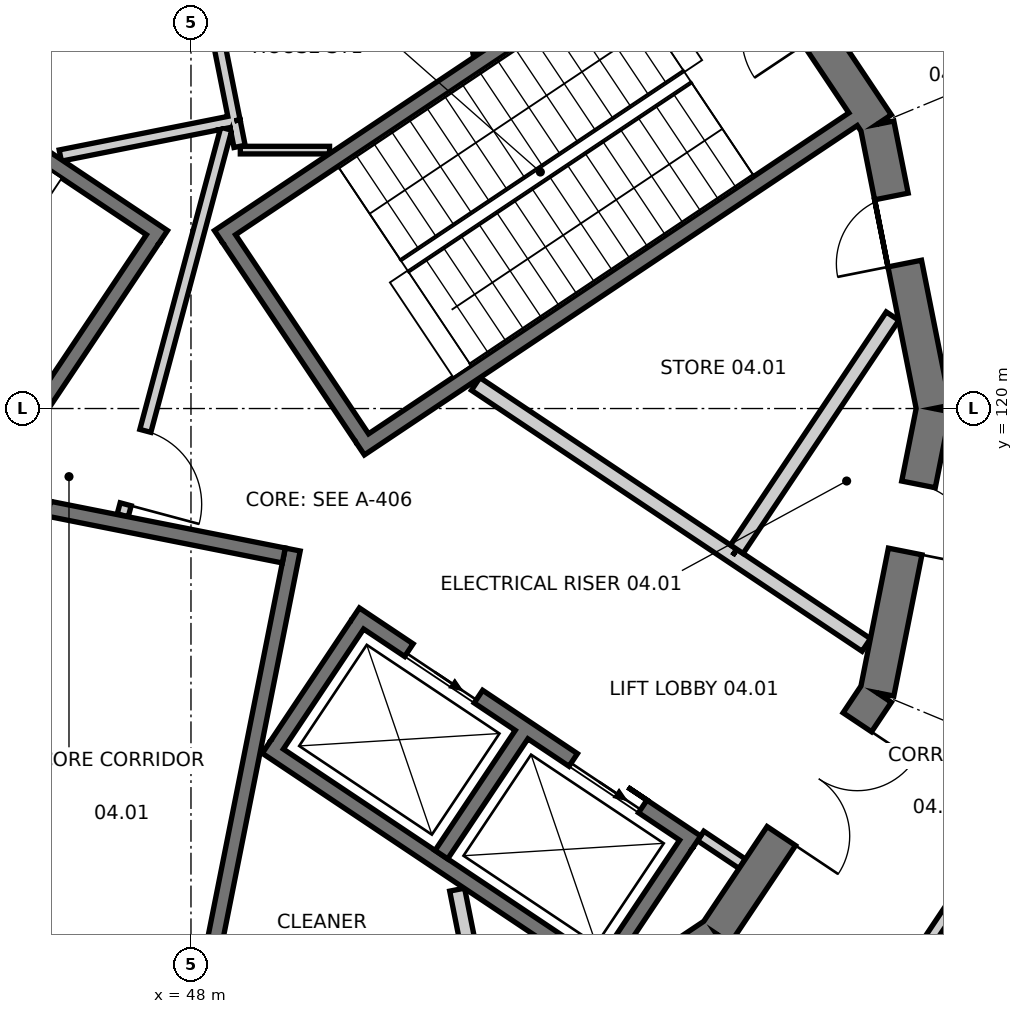
"""IFC4 building model, lengths in metres.
Left out: names, types, materials, properties, quantities, classifications, styles, units other than length and angle.
Written with IfcOpenShell. Run it as: python <this file> out.ifc"""

import sys

from ifc_helpers import new_model, si_unit, direction, frame, frame_2d, origin, place, context, subcontext, project, spatial, polyline, rectangle, outline, extrude, element, fill, save


model = new_model("IFC4")
c1 = context("Model", 3, precision=1e-05, world=origin(), true_north=direction((0.0, 1.0)))
c2 = subcontext(c1, "Body", "Model", "MODEL_VIEW")
j1 = project(units=[si_unit("LENGTHUNIT", "METRE"), si_unit("PLANEANGLEUNIT", "RADIAN")], contexts=[c1])
p1 = place(None, origin())
s1 = spatial("IfcSite", under=j1, at=p1, CompositionType="ELEMENT")
p2 = place(p1, origin())
s2 = spatial("IfcBuilding", under=s1, at=p2, CompositionType="ELEMENT")
p3 = place(p2, frame((0.0, 0.0, 20.4)))
s3 = spatial("IfcBuildingStorey", under=s2, at=p3, CompositionType="ELEMENT", Elevation=20.4)
p4 = place(p3, frame((57.771, 120.0, 0.0), z_axis=(0.0, 0.0, 1.0), x_axis=(-0.195069197673, 0.98078948206, 0.0)))
e1 = element("IfcWall", 1, at=p4, inside=s3, PredefinedType="SHEAR", context=c2, shape_type="SweptSolid", body=[
    extrude(outline(polyline([(-0.045, -0.225), (3.857, -0.225), (3.768, 0.225), (0.045, 0.225), (-0.045, -0.225)])), origin(), (0.0, 0.0, 1.0), 4.52),
])
p5 = place(p4, frame((1.945, 0.0, 0.0)))
e2 = element("IfcOpeningElement", 2, at=p5, cuts=e1, PredefinedType="OPENING", context=c2, shape_type="SweptSolid", body=[
    extrude(rectangle(XDim=0.9, YDim=2.1, at=frame_2d((0.45, 1.05))), frame((0.0, 0.235, 0.0), z_axis=(0.0, -1.0, 0.0), x_axis=(1.0, 0.0, 0.0)), (0.0, 0.0, 1.0), 0.47),
])
p6 = place(p3, frame((57.027, 123.739, 0.0), z_axis=(0.0, 0.0, 1.0), x_axis=(-0.555542277102, 0.83148829117, 0.0)))
e3 = element("IfcWall", 3, at=p6, inside=s3, PredefinedType="SHEAR", context=c2, shape_type="SweptSolid", body=[
    extrude(outline(polyline([(-0.045, -0.225), (3.857, -0.225), (3.768, 0.225), (0.045, 0.225), (-0.045, -0.225)])), origin(), (0.0, 0.0, 1.0), 4.52),
])
p7 = place(p6, frame((1.406, 0.0, 0.0)))
e4 = element("IfcOpeningElement", 4, at=p7, cuts=e3, PredefinedType="OPENING", context=c2, shape_type="SweptSolid", body=[
    extrude(rectangle(XDim=1.0, YDim=2.1, at=frame_2d((0.5, 1.05))), frame((0.0, 0.235, 0.0), z_axis=(0.0, -1.0, 0.0), x_axis=(1.0, 0.0, 0.0)), (0.0, 0.0, 1.0), 0.47),
])
p8 = place(p3, frame((51.739, 110.973, 0.0), z_axis=(0.0, 0.0, 1.0), x_axis=(0.83148829117, 0.555542277102, 0.0)))
e5 = element("IfcWall", 5, at=p8, inside=s3, PredefinedType="SHEAR", context=c2, shape_type="SweptSolid", body=[
    extrude(outline(polyline([(-0.045, -0.225), (3.857, -0.225), (3.768, 0.225), (0.045, 0.225), (-0.045, -0.225)])), origin(), (0.0, 0.0, 1.0), 4.52),
])
p9 = place(p3, frame((54.909, 113.091, 0.0), z_axis=(0.0, 0.0, 1.0), x_axis=(0.555542277102, 0.83148829117, 0.0)))
e6 = element("IfcWall", 6, at=p9, inside=s3, PredefinedType="SHEAR", context=c2, shape_type="SweptSolid", body=[
    extrude(outline(polyline([(-0.045, -0.225), (3.857, -0.225), (3.768, 0.225), (0.045, 0.225), (-0.045, -0.225)])), origin(), (0.0, 0.0, 1.0), 4.52),
])
p10 = place(p9, frame((1.545, 0.0, 0.0)))
e7 = element("IfcOpeningElement", 7, at=p10, cuts=e6, PredefinedType="OPENING", context=c2, shape_type="SweptSolid", body=[
    extrude(rectangle(XDim=1.8, YDim=2.1, at=frame_2d((0.9, 1.05))), frame((0.0, 0.235, 0.0), z_axis=(0.0, -1.0, 0.0), x_axis=(1.0, 0.0, 0.0)), (0.0, 0.0, 1.0), 0.47),
])
p11 = place(p3, frame((57.027, 116.261, 0.0), z_axis=(0.0, 0.0, 1.0), x_axis=(0.195069197673, 0.98078948206, 0.0)))
e8 = element("IfcWall", 8, at=p11, inside=s3, PredefinedType="SHEAR", context=c2, shape_type="SweptSolid", body=[
    extrude(outline(polyline([(-0.045, -0.225), (3.857, -0.225), (3.768, 0.225), (0.045, 0.225), (-0.045, -0.225)])), origin(), (0.0, 0.0, 1.0), 4.52),
])
p12 = place(p11, frame((1.895, 0.0, 0.0)))
e9 = element("IfcOpeningElement", 9, at=p12, cuts=e8, PredefinedType="OPENING", context=c2, shape_type="SweptSolid", body=[
    extrude(rectangle(XDim=0.9, YDim=2.1, at=frame_2d((0.45, 1.05))), frame((0.0, 0.235, 0.0), z_axis=(0.0, -1.0, 0.0), x_axis=(1.0, 0.0, 0.0)), (0.0, 0.0, 1.0), 0.47),
])
p13 = place(p3, frame((48.365, 122.258, 0.0), z_axis=(0.0, 0.0, 1.0), x_axis=(0.831476803301, 0.555559470779, 0.0)))
e10 = element("IfcWall", 10, at=p13, inside=s3, PredefinedType="SHEAR", context=c2, shape_type="SweptSolid", body=[
    extrude(rectangle(XDim=7.8, YDim=0.2, at=frame_2d((3.9, 0.0))), origin(), (0.0, 0.0, 1.0), 4.52),
])
p14 = place(p3, frame((50.226, 119.473, 0.0), z_axis=(0.0, 0.0, 1.0), x_axis=(0.831486463828, 0.555545012102, 0.0)))
e11 = element("IfcWall", 11, at=p14, inside=s3, PredefinedType="SHEAR", context=c2, shape_type="SweptSolid", body=[
    extrude(rectangle(XDim=7.8, YDim=0.2, at=frame_2d((3.9, 0.0))), origin(), (0.0, 0.0, 1.0), 4.52),
])
p15 = place(p3, frame((50.253, 119.612, 0.0), z_axis=(0.0, 0.0, 1.0), x_axis=(-0.55555842186, 0.831477504146, 0.0)))
e12 = element("IfcWall", 12, at=p15, inside=s3, PredefinedType="SHEAR", context=c2, shape_type="SweptSolid", body=[
    extrude(rectangle(XDim=3.15, YDim=0.2, at=frame_2d((1.575, 0.0))), origin(), (0.0, 0.0, 1.0), 4.52),
])
p16 = place(p3, frame((47.635, 122.258, 0.0), z_axis=(0.0, 0.0, 1.0), x_axis=(-0.831476803301, 0.555559470779, 0.0)))
e13 = element("IfcWall", 13, at=p16, inside=s3, PredefinedType="SHEAR", context=c2, shape_type="SweptSolid", body=[
    extrude(rectangle(XDim=7.8, YDim=0.2, at=frame_2d((3.9, 0.0))), origin(), (0.0, 0.0, 1.0), 4.52),
])
p17 = place(p3, frame((47.497, 122.231, 0.0), z_axis=(0.0, 0.0, 1.0), x_axis=(-0.55555842186, -0.831477504146, 0.0)))
e14 = element("IfcWall", 14, at=p17, inside=s3, PredefinedType="SHEAR", context=c2, shape_type="SweptSolid", body=[
    extrude(rectangle(XDim=3.15, YDim=0.2, at=frame_2d((1.575, 0.0))), origin(), (0.0, 0.0, 1.0), 4.52),
])
p18 = place(p3, frame((49.339, 118.145, 0.0), z_axis=(0.0, 0.0, 1.0), x_axis=(-0.195092759861, -0.980784795483, 0.0)))
e15 = element("IfcWall", 15, at=p18, inside=s3, PredefinedType="SHEAR", context=c2, shape_type="SweptSolid", body=[
    extrude(rectangle(XDim=7.8, YDim=0.2, at=frame_2d((3.9, 0.0))), origin(), (0.0, 0.0, 1.0), 4.52),
])
p19 = place(p3, frame((46.132, 118.681, 0.0), z_axis=(0.0, 0.0, 1.0), x_axis=(0.980785830564, -0.195087556151, 0.0)))
e16 = element("IfcWall", 16, at=p19, inside=s3, PredefinedType="SHEAR", context=c2, shape_type="SweptSolid", body=[
    extrude(rectangle(XDim=3.15, YDim=0.2, at=frame_2d((1.575, 0.0))), origin(), (0.0, 0.0, 1.0), 4.52),
])
p20 = place(p3, frame((50.16, 117.293, 0.0), z_axis=(0.0, 0.0, 1.0), x_axis=(0.831479497601, -0.55555543834, 0.0)))
e17 = element("IfcWall", 17, at=p20, inside=s3, PredefinedType="SHEAR", context=c2, shape_type="SweptSolid", body=[
    extrude(rectangle(XDim=5.4, YDim=0.2, at=frame_2d((2.7, 0.0))), origin(), (0.0, 0.0, 1.0), 9.02),
])
p21 = place(p20, frame((0.85, 0.0, 0.0)))
e18 = element("IfcOpeningElement", 18, at=p21, cuts=e17, PredefinedType="OPENING", context=c2, shape_type="SweptSolid", body=[
    extrude(rectangle(XDim=1.1, YDim=2.1, at=frame_2d((0.55, 1.05))), frame((0.0, 0.11, 0.0), z_axis=(0.0, -1.0, 0.0), x_axis=(1.0, 0.0, 0.0)), (0.0, 0.0, 1.0), 0.22),
])
p22 = place(p20, frame((3.45, 0.0, 0.0)))
e19 = element("IfcOpeningElement", 19, at=p22, cuts=e17, PredefinedType="OPENING", context=c2, shape_type="SweptSolid", body=[
    extrude(rectangle(XDim=1.1, YDim=2.1, at=frame_2d((0.55, 1.05))), frame((0.0, 0.11, 0.0), z_axis=(0.0, -1.0, 0.0), x_axis=(1.0, 0.0, 0.0)), (0.0, 0.0, 1.0), 0.22),
])
p23 = place(p3, frame((48.994, 115.548, 0.0), z_axis=(0.0, 0.0, 1.0), x_axis=(0.831444656906, -0.555607579593, 0.0)))
e20 = element("IfcWall", 20, at=p23, inside=s3, PredefinedType="SHEAR", context=c2, shape_type="SweptSolid", body=[
    extrude(rectangle(XDim=5.4, YDim=0.2, at=frame_2d((2.7, 0.0))), origin(), (0.0, 0.0, 1.0), 9.02),
])
p24 = place(p3, frame((50.188, 117.155, 0.0), z_axis=(0.0, 0.0, 1.0), x_axis=(-0.555559945722, -0.831476485963, 0.0)))
e21 = element("IfcWall", 21, at=p24, inside=s3, PredefinedType="SHEAR", context=c2, shape_type="SweptSolid", body=[
    extrude(rectangle(XDim=1.9, YDim=0.2, at=frame_2d((0.95, 0.0))), origin(), (0.0, 0.0, 1.0), 9.02),
])
p25 = place(p3, frame((52.35, 115.71, 0.0), z_axis=(0.0, 0.0, 1.0), x_axis=(-0.55550058618, -0.831516144614, 0.0)))
e22 = element("IfcWall", 22, at=p25, inside=s3, PredefinedType="SHEAR", context=c2, shape_type="SweptSolid", body=[
    extrude(rectangle(XDim=1.9, YDim=0.2, at=frame_2d((0.95, 0.0))), origin(), (0.0, 0.0, 1.0), 9.02),
])
p26 = place(p3, frame((54.512, 114.266, 0.0), z_axis=(0.0, 0.0, 1.0), x_axis=(-0.555589423235, -0.83145678949, 0.0)))
e23 = element("IfcWall", 23, at=p26, inside=s3, PredefinedType="SHEAR", context=c2, shape_type="SweptSolid", body=[
    extrude(rectangle(XDim=1.9, YDim=0.2, at=frame_2d((0.95, 0.0))), origin(), (0.0, 0.0, 1.0), 9.02),
])
p27 = place(p3, frame((48.365, 122.258, 4.8), z_axis=(0.0, 0.0, 1.0), x_axis=(0.831476803301, 0.555559470779, 0.0)))
e24 = element("IfcWall", 24, at=p27, inside=s3, PredefinedType="SOLIDWALL", context=c2, shape_type="SweptSolid", body=[
    extrude(rectangle(XDim=7.8, YDim=0.2, at=frame_2d((3.9, 0.0))), origin(), (0.0, 0.0, 1.0), 2.4),
])
p28 = place(p3, frame((50.226, 119.473, 4.8), z_axis=(0.0, 0.0, 1.0), x_axis=(0.831486463828, 0.555545012102, 0.0)))
e25 = element("IfcWall", 25, at=p28, inside=s3, PredefinedType="SOLIDWALL", context=c2, shape_type="SweptSolid", body=[
    extrude(rectangle(XDim=7.8, YDim=0.2, at=frame_2d((3.9, 0.0))), origin(), (0.0, 0.0, 1.0), 2.4),
])
p29 = place(p3, frame((50.253, 119.612, 4.8), z_axis=(0.0, 0.0, 1.0), x_axis=(-0.55555842186, 0.831477504146, 0.0)))
e26 = element("IfcWall", 26, at=p29, inside=s3, PredefinedType="SOLIDWALL", context=c2, shape_type="SweptSolid", body=[
    extrude(rectangle(XDim=3.15, YDim=0.2, at=frame_2d((1.575, 0.0))), origin(), (0.0, 0.0, 1.0), 2.4),
])
p30 = place(p3, frame((56.85, 123.779, 4.8), z_axis=(0.0, 0.0, 1.0), x_axis=(-0.555572709421, 0.831467957619, 0.0)))
e27 = element("IfcWall", 27, at=p30, inside=s3, PredefinedType="SOLIDWALL", context=c2, shape_type="SweptSolid", body=[
    extrude(rectangle(XDim=3.55, YDim=0.2, at=frame_2d((1.775, 0.0))), origin(), (0.0, 0.0, 1.0), 2.4),
])
p31 = place(p30, frame((1.275, 0.0, 0.16)))
e28 = element("IfcOpeningElement", 28, at=p31, cuts=e27, PredefinedType="OPENING", context=c2, shape_type="SweptSolid", body=[
    extrude(rectangle(XDim=1.0, YDim=2.1, at=frame_2d((0.5, 1.05))), frame((0.0, 0.11, 0.0), z_axis=(0.0, -1.0, 0.0), x_axis=(1.0, 0.0, 0.0)), (0.0, 0.0, 1.0), 0.22),
])
p32 = place(p3, frame((55.492, 123.112, 4.96), z_axis=(0.0, 0.0, 1.0), x_axis=(-0.555488691107, 0.831524091083, 0.0)))
e29 = element("IfcWall", 29, at=p32, inside=s3, PredefinedType="SOLIDWALL", context=c2, shape_type="SweptSolid", body=[
    extrude(rectangle(XDim=1.5, YDim=0.2, at=frame_2d((0.75, 0.0))), origin(), (0.0, 0.0, 1.0), 1.1),
])
p33 = place(p3, frame((47.635, 122.258, 4.8), z_axis=(0.0, 0.0, 1.0), x_axis=(-0.831476803301, 0.555559470779, 0.0)))
e30 = element("IfcWall", 30, at=p33, inside=s3, PredefinedType="SOLIDWALL", context=c2, shape_type="SweptSolid", body=[
    extrude(rectangle(XDim=7.8, YDim=0.2, at=frame_2d((3.9, 0.0))), origin(), (0.0, 0.0, 1.0), 2.4),
])
p34 = place(p3, frame((47.497, 122.231, 4.8), z_axis=(0.0, 0.0, 1.0), x_axis=(-0.55555842186, -0.831477504146, 0.0)))
e31 = element("IfcWall", 31, at=p34, inside=s3, PredefinedType="SOLIDWALL", context=c2, shape_type="SweptSolid", body=[
    extrude(rectangle(XDim=3.15, YDim=0.2, at=frame_2d((1.575, 0.0))), origin(), (0.0, 0.0, 1.0), 2.4),
])
p35 = place(p3, frame((55.126, 118.065, 0.0), z_axis=(0.0, 0.0, 1.0), x_axis=(-0.831495502265, 0.555531483998, 0.0)))
e32 = element("IfcWall", 32, at=p35, inside=s3, PredefinedType="SOLIDWALL", context=c2, shape_type="SweptSolid", body=[
    extrude(rectangle(XDim=4.065, YDim=0.2, at=frame_2d((2.033, 0.0))), origin(), (0.0, 0.0, 1.0), 4.52),
])
p36 = place(p3, frame((57.231, 121.215, 0.0), z_axis=(0.0, 0.0, 1.0), x_axis=(-0.555600969312, -0.831449074147, 0.0)))
e33 = element("IfcWall", 33, at=p36, inside=s3, PredefinedType="SOLIDWALL", context=c2, shape_type="SweptSolid", body=[
    extrude(rectangle(XDim=3.689, YDim=0.2, at=frame_2d((1.844, 0.0))), origin(), (0.0, 0.0, 1.0), 4.52),
])
p37 = place(p3, frame((56.885, 116.89, 0.0), z_axis=(0.0, 0.0, 1.0), x_axis=(-0.831446094913, 0.555605427667, 0.0)))
e34 = element("IfcWall", 34, at=p37, inside=s3, PredefinedType="SOLIDWALL", context=c2, shape_type="SweptSolid", body=[
    extrude(rectangle(XDim=2.115, YDim=0.2, at=frame_2d((1.058, 0.0))), origin(), (0.0, 0.0, 1.0), 4.52),
])
p38 = place(p3, frame((48.056, 126.384, 0.0), z_axis=(0.0, 0.0, 1.0), x_axis=(0.195123903338, -0.980778600065, 0.0)))
e35 = element("IfcWall", 35, at=p38, inside=s3, PredefinedType="PARTITIONING", context=c2, shape_type="SweptSolid", body=[
    extrude(rectangle(XDim=2.65, YDim=0.15, at=frame_2d((1.325, 0.0))), origin(), (0.0, 0.0, 1.0), 4.52),
])
p39 = place(p3, frame((48.524, 123.775, 0.0), z_axis=(0.0, 0.0, 1.0), x_axis=(-0.980777249161, -0.195130693455, 0.0)))
e36 = element("IfcWall", 36, at=p39, inside=s3, PredefinedType="PARTITIONING", context=c2, shape_type="SweptSolid", body=[
    extrude(rectangle(XDim=2.287, YDim=0.15, at=frame_2d((1.144, 0.0))), origin(), (0.0, 0.0, 1.0), 4.52),
])
p40 = place(p3, frame((50.911, 128.943, 0.0), z_axis=(0.0, 0.0, 1.0), x_axis=(0.195113868301, -0.980780596462, 0.0)))
e37 = element("IfcWall", 37, at=p40, inside=s3, PredefinedType="PARTITIONING", context=c2, shape_type="SweptSolid", body=[
    extrude(rectangle(XDim=4.357, YDim=0.1, at=frame_2d((2.178, 0.0))), origin(), (0.0, 0.0, 1.0), 4.52),
])
p41 = place(p3, frame((49.823, 123.4, 0.0), z_axis=(0.0, 0.0, 1.0), x_axis=(-1.0, 0.0, 0.0)))
e38 = element("IfcWall", 38, at=p41, inside=s3, PredefinedType="PARTITIONING", context=c2, shape_type="SweptSolid", body=[
    extrude(rectangle(XDim=1.174, YDim=0.1, at=frame_2d((0.587, 0.0))), origin(), (0.0, 0.0, 1.0), 4.52),
])
p42 = place(p3, frame((48.639, 123.449, 0.0), z_axis=(0.0, 0.0, 1.0), x_axis=(-0.194880473507, 0.98082699853, 0.0)))
e39 = element("IfcWall", 39, at=p42, inside=s3, PredefinedType="PARTITIONING", context=c2, shape_type="SweptSolid", body=[
    extrude(rectangle(XDim=0.342, YDim=0.15, at=frame_2d((0.171, 0.0))), origin(), (0.0, 0.0, 1.0), 4.52),
])
p43 = place(p3, frame((51.502, 113.67, 0.0), z_axis=(0.0, 0.0, 1.0), x_axis=(0.19508928515, -0.980785486648, 0.0)))
e40 = element("IfcWall", 40, at=p43, inside=s3, PredefinedType="SOLIDWALL", context=c2, shape_type="SweptSolid", body=[
    extrude(rectangle(XDim=2.286, YDim=0.2, at=frame_2d((1.143, 0.0))), origin(), (0.0, 0.0, 1.0), 4.52),
])
p44 = place(p3, frame((54.706, 114.377, 0.0), z_axis=(0.0, 0.0, 1.0), x_axis=(0.831421626399, -0.555642042286, 0.0)))
e41 = element("IfcWall", 41, at=p44, inside=s3, PredefinedType="PARTITIONING", context=c2, shape_type="SweptSolid", body=[
    extrude(rectangle(XDim=0.658, YDim=0.15, at=frame_2d((0.329, 0.0))), origin(), (0.0, 0.0, 1.0), 4.52),
])
p45 = place(p3, frame((47.102, 118.595, 0.0), z_axis=(0.0, 0.0, 1.0), x_axis=(0.258814124304, 0.9659271448, 0.0)))
e42 = element("IfcWall", 42, at=p45, inside=s3, PredefinedType="PARTITIONING", context=c2, shape_type="SweptSolid", body=[
    extrude(rectangle(XDim=5.265, YDim=0.15, at=frame_2d((2.632, 0.0))), origin(), (0.0, 0.0, 1.0), 4.52),
])
p46 = place(p45, frame((0.15, 0.0, 0.0)))
e43 = element("IfcOpeningElement", 43, at=p46, cuts=e42, PredefinedType="OPENING", context=c2, shape_type="SweptSolid", body=[
    extrude(rectangle(XDim=1.0, YDim=2.1, at=frame_2d((0.5, 1.05))), frame((0.0, 0.085, 0.0), z_axis=(0.0, -1.0, 0.0), x_axis=(1.0, 0.0, 0.0)), (0.0, 0.0, 1.0), 0.17),
])
p47 = place(p3, frame((56.627, 128.627, 0.0), z_axis=(0.0, 0.0, 1.0), x_axis=(0.555552075851, -0.831481744248, 0.0)))
e44 = element("IfcWall", 44, at=p47, inside=s3, PredefinedType="PARTITIONING", context=c2, shape_type="SweptSolid", body=[
    extrude(rectangle(XDim=4.76, YDim=0.15, at=frame_2d((2.38, 0.0))), origin(), (0.0, 0.0, 1.0), 4.52),
])
p48 = place(p47, frame((1.48, 0.0, 0.0)))
e45 = element("IfcOpeningElement", 45, at=p48, cuts=e44, PredefinedType="OPENING", context=c2, shape_type="SweptSolid", body=[
    extrude(rectangle(XDim=1.8, YDim=2.1, at=frame_2d((0.9, 1.05))), frame((0.0, 0.085, 0.0), z_axis=(0.0, -1.0, 0.0), x_axis=(1.0, 0.0, 0.0)), (0.0, 0.0, 1.0), 0.17),
])
p49 = place(p3, frame((59.271, 115.331, 0.0), z_axis=(0.0, 0.0, 1.0), x_axis=(-0.555552075851, -0.831481744248, 0.0)))
e46 = element("IfcWall", 46, at=p49, inside=s3, PredefinedType="PARTITIONING", context=c2, shape_type="SweptSolid", body=[
    extrude(rectangle(XDim=4.76, YDim=0.15, at=frame_2d((2.38, 0.0))), origin(), (0.0, 0.0, 1.0), 4.52),
])
p50 = place(p21, origin())
e47 = element("IfcDoor", 47, at=p50, inside=s3, OperationType="SLIDING_TO_LEFT", PredefinedType="DOOR", context=c2, shape_type="SweptSolid", body=[
    extrude(rectangle(XDim=1.1, YDim=2.1, at=frame_2d((0.55, 1.05))), frame((0.0, 0.025, 0.0), z_axis=(0.0, -1.0, 0.0), x_axis=(1.0, 0.0, 0.0)), (0.0, 0.0, 1.0), 0.05),
])
fill(e18, e47)
p51 = place(p22, origin())
e48 = element("IfcDoor", 48, at=p51, inside=s3, OperationType="SLIDING_TO_LEFT", PredefinedType="DOOR", context=c2, shape_type="SweptSolid", body=[
    extrude(rectangle(XDim=1.1, YDim=2.1, at=frame_2d((0.55, 1.05))), frame((0.0, 0.025, 0.0), z_axis=(0.0, -1.0, 0.0), x_axis=(1.0, 0.0, 0.0)), (0.0, 0.0, 1.0), 0.05),
])
fill(e19, e48)
p52 = place(p5, origin())
e49 = element("IfcDoor", 49, at=p52, inside=s3, OperationType="SINGLE_SWING_LEFT", PredefinedType="DOOR", context=c2, shape_type="SweptSolid", body=[
    extrude(rectangle(XDim=0.9, YDim=2.1, at=frame_2d((0.45, 1.05))), frame((0.0, 0.025, 0.0), z_axis=(0.0, -1.0, 0.0), x_axis=(1.0, 0.0, 0.0)), (0.0, 0.0, 1.0), 0.05),
])
fill(e2, e49)
p53 = place(p12, frame((0.9, 0.0, 0.0), z_axis=(0.0, 0.0, 1.0), x_axis=(-1.0, 0.0, 0.0)))
e50 = element("IfcDoor", 50, at=p53, inside=s3, OperationType="SINGLE_SWING_RIGHT", PredefinedType="DOOR", context=c2, shape_type="SweptSolid", body=[
    extrude(rectangle(XDim=0.9, YDim=2.1, at=frame_2d((0.45, 1.05))), frame((0.0, 0.025, 0.0), z_axis=(0.0, -1.0, 0.0), x_axis=(1.0, 0.0, 0.0)), (0.0, 0.0, 1.0), 0.05),
])
fill(e9, e50)
p54 = place(p10, frame((1.8, 0.0, 0.0), z_axis=(0.0, 0.0, 1.0), x_axis=(-1.0, 0.0, 0.0)))
e51 = element("IfcDoor", 51, at=p54, inside=s3, OperationType="DOUBLE_DOOR_SINGLE_SWING", PredefinedType="DOOR", context=c2, shape_type="SweptSolid", body=[
    extrude(rectangle(XDim=1.8, YDim=2.1, at=frame_2d((0.9, 1.05))), frame((0.0, 0.025, 0.0), z_axis=(0.0, -1.0, 0.0), x_axis=(1.0, 0.0, 0.0)), (0.0, 0.0, 1.0), 0.05),
])
fill(e7, e51)
p55 = place(p46, frame((1.0, 0.0, 0.0), z_axis=(0.0, 0.0, 1.0), x_axis=(-1.0, 0.0, 0.0)))
e52 = element("IfcDoor", 52, at=p55, inside=s3, OperationType="SINGLE_SWING_RIGHT", PredefinedType="DOOR", context=c2, shape_type="SweptSolid", body=[
    extrude(rectangle(XDim=1.0, YDim=2.1, at=frame_2d((0.5, 1.05))), frame((0.0, 0.025, 0.0), z_axis=(0.0, -1.0, 0.0), x_axis=(1.0, 0.0, 0.0)), (0.0, 0.0, 1.0), 0.05),
])
fill(e43, e52)
save(model, sys.argv[1])
